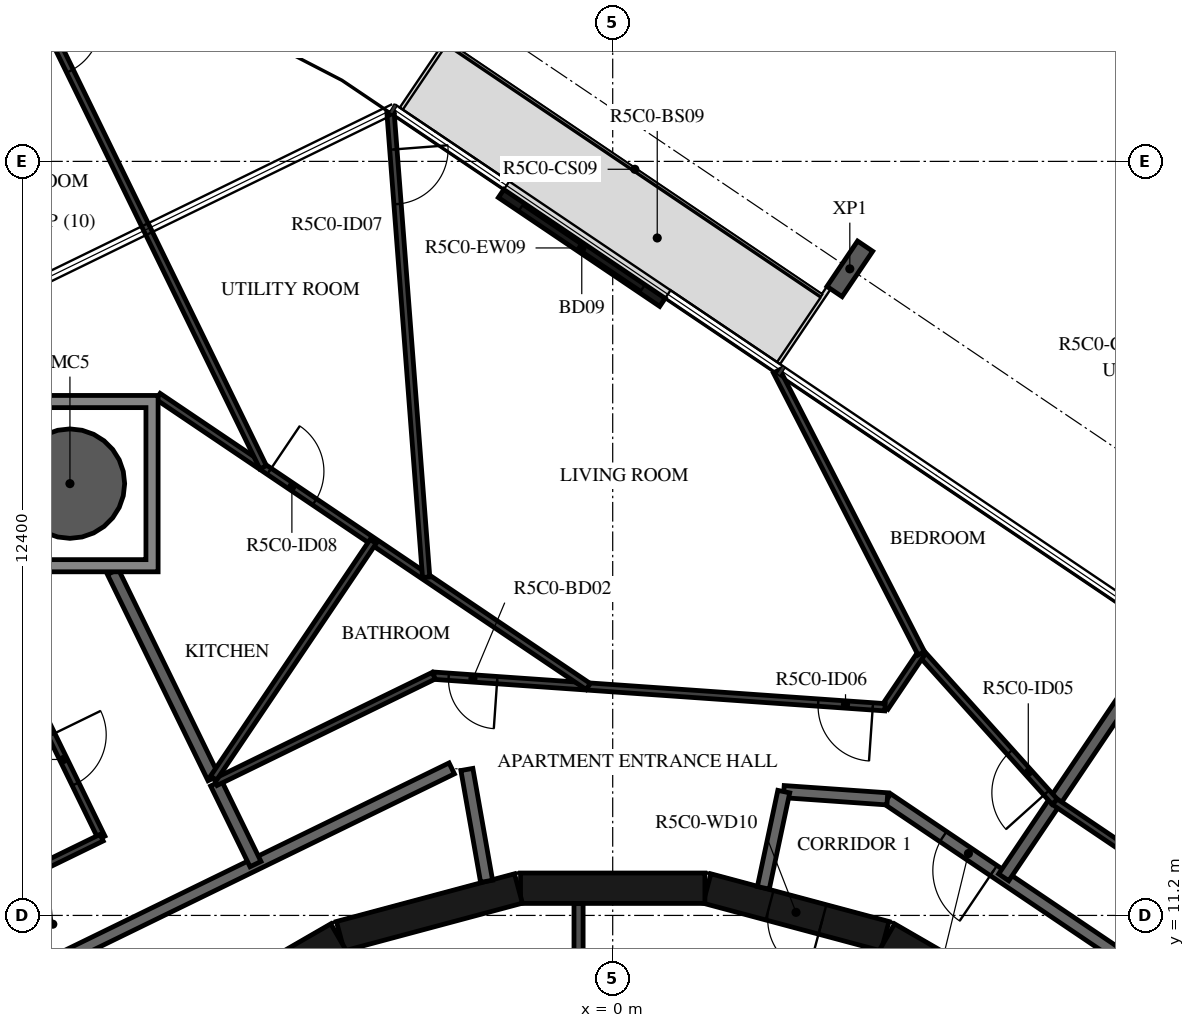
"""IFC4 building model, lengths in metres.
Left out: names, types, materials, properties, quantities, classifications, styles, units other than length and angle.
Written with IfcOpenShell. Run it as: python <this file> out.ifc"""

import sys

from ifc_helpers import new_model, si_unit, direction, frame, frame_2d, origin, origin_2d, place, context, subcontext, project, spatial, polyline, rectangle, hollow_circle, i_section, outline, extrude, element, fill, save


model = new_model("IFC4")
c1 = context("Model", 3, precision=1e-05, world=origin(), true_north=direction((0.0, 1.0)))
c2 = subcontext(c1, "Body", "Model", "MODEL_VIEW")
j1 = project(units=[si_unit("LENGTHUNIT", "METRE"), si_unit("PLANEANGLEUNIT", "RADIAN")], contexts=[c1])
p1 = place(None, origin())
s1 = spatial("IfcSite", under=j1, at=p1, CompositionType="ELEMENT")
p2 = place(p1, origin())
s2 = spatial("IfcBuilding", under=s1, at=p2, CompositionType="ELEMENT")
p3 = place(p2, frame((0.0, 0.0, 216.4)))
s3 = spatial("IfcBuildingStorey", under=s2, at=p3, CompositionType="ELEMENT", Elevation=216.4)
p4 = place(p3, frame((-8.926, 18.301, -0.38), z_axis=(0.0, 0.0, 1.0), x_axis=(1.0, 0.0, 0.0)))
e1 = element("IfcColumn", 1, at=p4, inside=s3, PredefinedType="COLUMN", context=c2, shape_type="SweptSolid", body=[
    extrude(hollow_circle(Radius=0.9, WallThickness=0.04, at=origin_2d()), origin(), (0.0, 0.0, 1.0), 2.616),
])
p5 = place(p3, frame((3.899, 21.833, -0.38), z_axis=(0.0, 0.0, 1.0), x_axis=(0.829037661466, -0.559192771654, 0.0)))
e2 = element("IfcColumn", 2, at=p5, inside=s3, PredefinedType="COLUMN", context=c2, shape_type="SweptSolid", body=[
    extrude(i_section(OverallWidth=0.3, OverallDepth=0.9, WebThickness=0.019, FlangeThickness=0.035, FilletRadius=0.03, at=origin_2d()), origin(), (0.0, 0.0, 1.0), 2.616),
])
p6 = place(p3, frame((0.818, 21.282, 0.0), z_axis=(0.0, 0.0, 1.0), x_axis=(-0.829044984211, 0.559181915082, 0.0)))
e3 = element("IfcWall", 3, at=p6, inside=s3, PredefinedType="STANDARD", context=c2, shape_type="SweptSolid", body=[
    extrude(rectangle(XDim=3.2, YDim=0.16, at=frame_2d((1.6, 0.0))), origin(), (0.0, 0.0, 1.0), 3.05),
])
p7 = place(p6, frame((0.4, 0.0, 0.0)))
e4 = element("IfcOpeningElement", 4, at=p7, cuts=e3, PredefinedType="OPENING", context=c2, shape_type="SweptSolid", body=[
    extrude(rectangle(XDim=2.4, YDim=2.4, at=frame_2d((1.2, 1.2))), frame((0.0, 0.09, 0.0), z_axis=(0.0, -1.0, 0.0), x_axis=(1.0, 0.0, 0.0)), (0.0, 0.0, 1.0), 0.18),
])
p8 = place(p3, frame((7.137, 9.329, 0.0), z_axis=(0.0, 0.0, 1.0), x_axis=(-0.865975092491, 0.500087131594, 0.0)))
e5 = element("IfcWall", 5, at=p8, inside=s3, PredefinedType="SHEAR", context=c2, shape_type="SweptSolid", body=[
    extrude(rectangle(XDim=3.033, YDim=0.5, at=frame_2d((1.516, 0.0))), origin(), (0.0, 0.0, 1.0), 3.05),
])
p9 = place(p3, frame((4.479, 10.858, 0.0), z_axis=(0.0, 0.0, 1.0), x_axis=(-0.965948410781, 0.258734743916, 0.0)))
e6 = element("IfcWall", 6, at=p9, inside=s3, PredefinedType="SHEAR", context=c2, shape_type="SweptSolid", body=[
    extrude(rectangle(XDim=3.033, YDim=0.5, at=frame_2d((1.516, 0.0))), origin(), (0.0, 0.0, 1.0), 3.05),
])
p10 = place(p9, frame((1.066, 0.0, 0.0)))
e7 = element("IfcOpeningElement", 7, at=p10, cuts=e6, PredefinedType="OPENING", context=c2, shape_type="SweptSolid", body=[
    extrude(rectangle(XDim=0.9, YDim=2.1, at=frame_2d((0.45, 1.05))), frame((0.0, 0.26, 0.0), z_axis=(0.0, -1.0, 0.0), x_axis=(1.0, 0.0, 0.0)), (0.0, 0.0, 1.0), 0.52),
])
for number, where, z_axis, x_axis in (
    (8, (1.516, 11.647, 0.0), (0.0, 0.0, 1.0), (-1.0, 0.0, 0.0)),
    (9, (-1.55, 11.643, 0.0), (0.0, 0.0, 1.0), (-0.966, -0.259, 0.0)),
    (10, (-4.51, 10.845, 0.0), (0.0, 0.0, 1.0), (-0.866, -0.5, 0.0)),
):
    element("IfcWall", number, at=place(p3, frame(where, z_axis=z_axis, x_axis=x_axis)), inside=s3, PredefinedType="SHEAR", context=c2, shape_type="SweptSolid", body=[
        extrude(rectangle(XDim=3.033, YDim=0.5, at=frame_2d((1.516, 0.0))), origin(), (0.0, 0.0, 1.0), 3.05),
    ])
p11 = place(p3, frame((-0.562, 8.97, 0.0), z_axis=(0.0, 0.0, 1.0), x_axis=(0.0, 1.0, 0.0)))
e11 = element("IfcWall", 11, at=p11, inside=s3, PredefinedType="PARTITIONING", context=c2, shape_type="SweptSolid", body=[
    extrude(rectangle(XDim=2.427, YDim=0.15, at=frame_2d((1.214, 0.0))), origin(), (0.0, 0.0, 1.0), 3.05),
])
p12 = place(p11, frame((0.764, 0.0, 0.0)))
e12 = element("IfcOpeningElement", 12, at=p12, cuts=e11, PredefinedType="OPENING", context=c2, shape_type="SweptSolid", body=[
    extrude(rectangle(XDim=0.9, YDim=2.1, at=frame_2d((0.45, 1.05))), frame((0.0, 0.085, 0.0), z_axis=(0.0, -1.0, 0.0), x_axis=(1.0, 0.0, 0.0)), (0.0, 0.0, 1.0), 0.17),
])
p13 = place(p3, frame((10.47, 9.101, 0.0), z_axis=(0.0, 0.0, 1.0), x_axis=(-0.829035841718, 0.559195469534, 0.0)))
e13 = element("IfcWall", 13, at=p13, inside=s3, PredefinedType="STANDARD", context=c2, shape_type="SweptSolid", body=[
    extrude(rectangle(XDim=7.181, YDim=0.2, at=frame_2d((3.591, 0.0))), origin(), (0.0, 0.0, 1.0), 3.05),
])
p14 = place(p13, frame((0.2, 0.0, 0.0)))
e14 = element("IfcOpeningElement", 14, at=p14, cuts=e13, PredefinedType="OPENING", context=c2, shape_type="SweptSolid", body=[
    extrude(rectangle(XDim=1.0, YDim=2.1, at=frame_2d((0.5, 1.05))), frame((0.0, 0.11, 0.0), z_axis=(0.0, -1.0, 0.0), x_axis=(1.0, 0.0, 0.0)), (0.0, 0.0, 1.0), 0.22),
])
p15 = place(p13, frame((5.073, 0.0, 0.0)))
e15 = element("IfcOpeningElement", 15, at=p15, cuts=e13, PredefinedType="OPENING", context=c2, shape_type="SweptSolid", body=[
    extrude(rectangle(XDim=1.0, YDim=2.1, at=frame_2d((0.5, 1.05))), frame((0.0, 0.11, 0.0), z_axis=(0.0, -1.0, 0.0), x_axis=(1.0, 0.0, 0.0)), (0.0, 0.0, 1.0), 0.22),
])
p16 = place(p3, frame((4.517, 13.117, 0.0), z_axis=(0.0, 0.0, 1.0), x_axis=(-0.997562153664, 0.069783591025, 0.0)))
e16 = element("IfcWall", 16, at=p16, inside=s3, PredefinedType="STANDARD", context=c2, shape_type="SweptSolid", body=[
    extrude(rectangle(XDim=1.707, YDim=0.2, at=frame_2d((0.854, 0.0))), origin(), (0.0, 0.0, 1.0), 3.05),
])
p17 = place(p3, frame((2.813, 13.236, 0.0), z_axis=(0.0, 0.0, 1.0), x_axis=(-0.207911086063, -0.978147729278, 0.0)))
e17 = element("IfcWall", 17, at=p17, inside=s3, PredefinedType="STANDARD", context=c2, shape_type="SweptSolid", body=[
    extrude(rectangle(XDim=1.618, YDim=0.2, at=frame_2d((0.809, 0.0))), origin(), (0.0, 0.0, 1.0), 3.05),
])
p18 = place(p3, frame((-2.074, 11.761, 0.0), z_axis=(0.0, 0.0, 1.0), x_axis=(-0.173740587112, 0.984791454263, 0.0)))
e18 = element("IfcWall", 18, at=p18, inside=s3, PredefinedType="STANDARD", context=c2, shape_type="SweptSolid", body=[
    extrude(rectangle(XDim=1.867, YDim=0.2, at=frame_2d((0.934, 0.0))), origin(), (0.0, 0.0, 1.0), 3.05),
])
p19 = place(p3, frame((-2.647, 13.618, 0.0), z_axis=(0.0, 0.0, 1.0), x_axis=(-0.898796543751, -0.438366026218, 0.0)))
e19 = element("IfcWall", 19, at=p19, inside=s3, PredefinedType="STANDARD", context=c2, shape_type="SweptSolid", body=[
    extrude(rectangle(XDim=7.181, YDim=0.2, at=frame_2d((3.591, 0.0))), origin(), (0.0, 0.0, 1.0), 3.05),
])
p20 = place(p3, frame((9.104, 15.79, 0.0), z_axis=(0.0, 0.0, 1.0), x_axis=(-0.559193912135, -0.829036892201, 0.0)))
e20 = element("IfcWall", 20, at=p20, inside=s3, PredefinedType="STANDARD", context=c2, shape_type="SweptSolid", body=[
    extrude(rectangle(XDim=4.781, YDim=0.2, at=frame_2d((2.39, 0.0))), origin(), (0.0, 0.0, 1.0), 3.05),
])
p21 = place(p3, frame((-6.522, 13.373, 0.0), z_axis=(0.0, 0.0, 1.0), x_axis=(0.438277270821, -0.8988398266, 0.0)))
e21 = element("IfcWall", 21, at=p21, inside=s3, PredefinedType="STANDARD", context=c2, shape_type="SweptSolid", body=[
    extrude(rectangle(XDim=1.479, YDim=0.2, at=frame_2d((0.74, 0.0))), origin(), (0.0, 0.0, 1.0), 3.05),
])
p22 = place(p3, frame((-8.219, 16.851, 0.0), z_axis=(0.0, 0.0, 1.0), x_axis=(0.438291091101, -0.898833087654, 0.0)))
e22 = element("IfcWall", 22, at=p22, inside=s3, PredefinedType="STANDARD", context=c2, shape_type="SweptSolid", body=[
    extrude(rectangle(XDim=3.774, YDim=0.2, at=frame_2d((1.887, 0.0))), origin(), (0.0, 0.0, 1.0), 3.05),
])
p23 = place(p3, frame((11.642, 10.12, 0.0), z_axis=(0.0, 0.0, 1.0), x_axis=(-0.829054664054, 0.559167563446, 0.0)))
e23 = element("IfcWall", 23, at=p23, inside=s3, PredefinedType="PARTITIONING", context=c2, shape_type="SweptSolid", body=[
    extrude(rectangle(XDim=5.275, YDim=0.12, at=frame_2d((2.637, 0.0))), origin(), (0.0, 0.0, 1.0), 3.05),
])
p24 = place(p23, frame((0.2, 0.0, 0.0)))
e24 = element("IfcOpeningElement", 24, at=p24, cuts=e23, PredefinedType="OPENING", context=c2, shape_type="SweptSolid", body=[
    extrude(rectangle(XDim=0.9, YDim=2.1, at=frame_2d((0.45, 1.05))), frame((0.0, 0.07, 0.0), z_axis=(0.0, -1.0, 0.0), x_axis=(1.0, 0.0, 0.0)), (0.0, 0.0, 1.0), 0.14),
])
p25 = place(p3, frame((7.269, 13.07, 0.0), z_axis=(0.0, 0.0, 1.0), x_axis=(-0.668495993587, 0.743715743116, 0.0)))
e25 = element("IfcWall", 25, at=p25, inside=s3, PredefinedType="PARTITIONING", context=c2, shape_type="SweptSolid", body=[
    extrude(rectangle(XDim=3.281, YDim=0.12, at=frame_2d((1.641, 0.0))), origin(), (0.0, 0.0, 1.0), 3.05),
])
p26 = place(p25, frame((0.2, 0.0, 0.0)))
e26 = element("IfcOpeningElement", 26, at=p26, cuts=e25, PredefinedType="OPENING", context=c2, shape_type="SweptSolid", body=[
    extrude(rectangle(XDim=0.9, YDim=2.1, at=frame_2d((0.45, 1.05))), frame((0.0, 0.07, 0.0), z_axis=(0.0, -1.0, 0.0), x_axis=(1.0, 0.0, 0.0)), (0.0, 0.0, 1.0), 0.14),
])
p27 = place(p3, frame((5.075, 15.51, 0.0), z_axis=(0.0, 0.0, 1.0), x_axis=(-0.559221936342, -0.829017988896, 0.0)))
e27 = element("IfcWall", 27, at=p27, inside=s3, PredefinedType="PARTITIONING", context=c2, shape_type="SweptSolid", body=[
    extrude(rectangle(XDim=1.07, YDim=0.12, at=frame_2d((0.535, 0.0))), origin(), (0.0, 0.0, 1.0), 3.05),
])
p28 = place(p3, frame((4.477, 14.623, 0.0), z_axis=(0.0, 0.0, 1.0), x_axis=(-0.997564862172, 0.069744861884, 0.0)))
e28 = element("IfcWall", 28, at=p28, inside=s3, PredefinedType="PARTITIONING", context=c2, shape_type="SweptSolid", body=[
    extrude(rectangle(XDim=7.438, YDim=0.12, at=frame_2d((3.719, 0.0))), origin(), (0.0, 0.0, 1.0), 3.05),
])
p29 = place(p28, frame((0.2, 0.0, 0.0)))
e29 = element("IfcOpeningElement", 29, at=p29, cuts=e28, PredefinedType="OPENING", context=c2, shape_type="SweptSolid", body=[
    extrude(rectangle(XDim=0.9, YDim=2.1, at=frame_2d((0.45, 1.05))), frame((0.0, 0.07, 0.0), z_axis=(0.0, -1.0, 0.0), x_axis=(1.0, 0.0, 0.0)), (0.0, 0.0, 1.0), 0.14),
])
p30 = place(p28, frame((6.392, 0.0, 0.0)))
e30 = element("IfcOpeningElement", 30, at=p30, cuts=e28, PredefinedType="OPENING", context=c2, shape_type="SweptSolid", body=[
    extrude(rectangle(XDim=0.8, YDim=2.1, at=frame_2d((0.4, 1.05))), frame((0.0, 0.07, 0.0), z_axis=(0.0, -1.0, 0.0), x_axis=(1.0, 0.0, 0.0)), (0.0, 0.0, 1.0), 0.14),
])
p31 = place(p3, frame((-2.943, 15.142, 0.0), z_axis=(0.0, 0.0, 1.0), x_axis=(-0.89881075705, -0.438336883014, 0.0)))
e31 = element("IfcWall", 31, at=p31, inside=s3, PredefinedType="PARTITIONING", context=c2, shape_type="SweptSolid", body=[
    extrude(rectangle(XDim=3.992, YDim=0.12, at=frame_2d((1.996, 0.0))), origin(), (0.0, 0.0, 1.0), 3.05),
])
p32 = place(p3, frame((2.696, 20.148, 0.0), z_axis=(0.0, 0.0, 1.0), x_axis=(0.456387956197, -0.889780890691, 0.0)))
e32 = element("IfcWall", 32, at=p32, inside=s3, PredefinedType="PARTITIONING", context=c2, shape_type="SweptSolid", body=[
    extrude(rectangle(XDim=5.213, YDim=0.12, at=frame_2d((2.606, 0.0))), origin(), (0.0, 0.0, 1.0), 3.05),
])
p33 = place(p3, frame((-7.476, 19.735, 0.0), z_axis=(0.0, 0.0, 1.0), x_axis=(0.829035412992, -0.559196105142, 0.0)))
e33 = element("IfcWall", 33, at=p33, inside=s3, PredefinedType="PARTITIONING", context=c2, shape_type="SweptSolid", body=[
    extrude(rectangle(XDim=8.531, YDim=0.12, at=frame_2d((4.266, 0.0))), origin(), (0.0, 0.0, 1.0), 3.05),
])
p34 = place(p33, frame((2.204, 0.0, 0.0)))
e34 = element("IfcOpeningElement", 34, at=p34, cuts=e33, PredefinedType="OPENING", context=c2, shape_type="SweptSolid", body=[
    extrude(rectangle(XDim=0.9, YDim=2.1, at=frame_2d((0.45, 1.05))), frame((0.0, 0.07, 0.0), z_axis=(0.0, -1.0, 0.0), x_axis=(1.0, 0.0, 0.0)), (0.0, 0.0, 1.0), 0.14),
])
p35 = place(p3, frame((-3.653, 24.394, 0.0), z_axis=(0.0, 0.0, 1.0), x_axis=(0.076513576433, -0.997068539581, 0.0)))
e35 = element("IfcWall", 35, at=p35, inside=s3, PredefinedType="PARTITIONING", context=c2, shape_type="SweptSolid", body=[
    extrude(rectangle(XDim=7.655, YDim=0.12, at=frame_2d((3.827, 0.0))), origin(), (0.0, 0.0, 1.0), 3.05),
])
p36 = place(p35, frame((0.6, 0.0, 0.0)))
e36 = element("IfcOpeningElement", 36, at=p36, cuts=e35, PredefinedType="OPENING", context=c2, shape_type="SweptSolid", body=[
    extrude(rectangle(XDim=0.9, YDim=2.1, at=frame_2d((0.45, 1.05))), frame((0.0, 0.07, 0.0), z_axis=(0.0, -1.0, 0.0), x_axis=(1.0, 0.0, 0.0)), (0.0, 0.0, 1.0), 0.14),
])
p37 = place(p3, frame((-3.939, 17.35, 0.0), z_axis=(0.0, 0.0, 1.0), x_axis=(-0.559193216274, -0.829037361566, 0.0)))
e37 = element("IfcWall", 37, at=p37, inside=s3, PredefinedType="PARTITIONING", context=c2, shape_type="SweptSolid", body=[
    extrude(rectangle(XDim=4.694, YDim=0.12, at=frame_2d((2.347, 0.0))), origin(), (0.0, 0.0, 1.0), 3.05),
])
p38 = place(p3, frame((-9.496, 26.254, 0.0), z_axis=(0.0, 0.0, 1.0), x_axis=(0.438361739807, -0.89879863433, 0.0)))
e38 = element("IfcWall", 38, at=p38, inside=s3, PredefinedType="PARTITIONING", context=c2, shape_type="SweptSolid", body=[
    extrude(rectangle(XDim=8.549, YDim=0.12, at=frame_2d((4.274, 0.0))), origin(), (0.0, 0.0, 1.0), 3.05),
])
p39 = place(p38, frame((0.4, 0.0, 0.0)))
e39 = element("IfcOpeningElement", 39, at=p39, cuts=e38, PredefinedType="OPENING", context=c2, shape_type="SweptSolid", body=[
    extrude(rectangle(XDim=0.9, YDim=2.1, at=frame_2d((0.45, 1.05))), frame((0.0, 0.07, 0.0), z_axis=(0.0, -1.0, 0.0), x_axis=(1.0, 0.0, 0.0)), (0.0, 0.0, 1.0), 0.14),
])
p40 = place(p3, frame((-10.5, 16.775, 0.0), z_axis=(0.0, 0.0, 1.0), x_axis=(0.438345136783, -0.898806731761, 0.0)))
e40 = element("IfcWall", 40, at=p40, inside=s3, PredefinedType="PARTITIONING", context=c2, shape_type="SweptSolid", body=[
    extrude(rectangle(XDim=4.78, YDim=0.12, at=frame_2d((2.39, 0.0))), origin(), (0.0, 0.0, 1.0), 3.05),
])
p41 = place(p40, frame((0.7, 0.0, 0.0)))
e41 = element("IfcOpeningElement", 41, at=p41, cuts=e40, PredefinedType="OPENING", context=c2, shape_type="SweptSolid", body=[
    extrude(rectangle(XDim=0.8, YDim=2.1, at=frame_2d((0.4, 1.05))), frame((0.0, 0.07, 0.0), z_axis=(0.0, -1.0, 0.0), x_axis=(1.0, 0.0, 0.0)), (0.0, 0.0, 1.0), 0.14),
])
p42 = place(p40, frame((2.899, 0.0, 0.0)))
e42 = element("IfcOpeningElement", 42, at=p42, cuts=e40, PredefinedType="OPENING", context=c2, shape_type="SweptSolid", body=[
    extrude(rectangle(XDim=0.9, YDim=2.1, at=frame_2d((0.45, 1.05))), frame((0.0, 0.07, 0.0), z_axis=(0.0, -1.0, 0.0), x_axis=(1.0, 0.0, 0.0)), (0.0, 0.0, 1.0), 0.14),
])
p43 = place(p3, frame((-8.405, 12.479, 0.0), z_axis=(0.0, 0.0, 1.0), x_axis=(-0.898784427692, -0.438390867307, 0.0)))
e43 = element("IfcWall", 43, at=p43, inside=s3, PredefinedType="PARTITIONING", context=c2, shape_type="SweptSolid", body=[
    extrude(rectangle(XDim=1.908, YDim=0.12, at=frame_2d((0.954, 0.0))), origin(), (0.0, 0.0, 1.0), 3.05),
])
p44 = place(p3, origin())
e44 = element("IfcWall", 44, at=p44, inside=s3, PredefinedType="STANDARD", context=c2, shape_type="SweptSolid", body=[
    extrude(outline(polyline([(-7.476, 19.751), (-7.476, 16.851), (-10.376, 16.851), (-10.376, 19.751), (-7.476, 19.751)]), holes=[polyline([(-10.176, 17.051), (-7.676, 17.051), (-7.676, 19.551), (-10.176, 19.551), (-10.176, 17.051)])]), origin(), (0.0, 0.0, 1.0), 3.05),
])
p45 = place(p7, origin())
e45 = element("IfcDoor", 45, at=p45, inside=s3, OperationType="DOUBLE_DOOR_SLIDING", PredefinedType="DOOR", context=c2, shape_type="SweptSolid", body=[
    extrude(rectangle(XDim=2.4, YDim=2.4, at=frame_2d((1.2, 1.2))), frame((0.0, 0.025, 0.0), z_axis=(0.0, -1.0, 0.0), x_axis=(1.0, 0.0, 0.0)), (0.0, 0.0, 1.0), 0.05),
])
fill(e4, e45)
p46 = place(p10, origin())
e46 = element("IfcDoor", 46, at=p46, inside=s3, OperationType="SINGLE_SWING_RIGHT", PredefinedType="DOOR", context=c2, shape_type="SweptSolid", body=[
    extrude(rectangle(XDim=0.9, YDim=2.1, at=frame_2d((0.45, 1.05))), frame((0.0, 0.025, 0.0), z_axis=(0.0, -1.0, 0.0), x_axis=(1.0, 0.0, 0.0)), (0.0, 0.0, 1.0), 0.05),
])
fill(e7, e46)
p47 = place(p15, origin())
e47 = element("IfcDoor", 47, at=p47, inside=s3, OperationType="SINGLE_SWING_RIGHT", PredefinedType="DOOR", context=c2, shape_type="SweptSolid", body=[
    extrude(rectangle(XDim=1.0, YDim=2.1, at=frame_2d((0.5, 1.05))), frame((0.0, 0.025, 0.0), z_axis=(0.0, -1.0, 0.0), x_axis=(1.0, 0.0, 0.0)), (0.0, 0.0, 1.0), 0.05),
])
fill(e15, e47)
p48 = place(p26, origin())
e48 = element("IfcDoor", 48, at=p48, inside=s3, OperationType="SINGLE_SWING_RIGHT", PredefinedType="DOOR", context=c2, shape_type="SweptSolid", body=[
    extrude(rectangle(XDim=0.9, YDim=2.1, at=frame_2d((0.45, 1.05))), frame((0.0, 0.025, 0.0), z_axis=(0.0, -1.0, 0.0), x_axis=(1.0, 0.0, 0.0)), (0.0, 0.0, 1.0), 0.05),
])
fill(e26, e48)
p49 = place(p29, origin())
e49 = element("IfcDoor", 49, at=p49, inside=s3, OperationType="SINGLE_SWING_RIGHT", PredefinedType="DOOR", context=c2, shape_type="SweptSolid", body=[
    extrude(rectangle(XDim=0.9, YDim=2.1, at=frame_2d((0.45, 1.05))), frame((0.0, 0.025, 0.0), z_axis=(0.0, -1.0, 0.0), x_axis=(1.0, 0.0, 0.0)), (0.0, 0.0, 1.0), 0.05),
])
fill(e29, e49)
p50 = place(p30, origin())
e50 = element("IfcDoor", 50, at=p50, inside=s3, OperationType="SINGLE_SWING_RIGHT", PredefinedType="DOOR", context=c2, shape_type="SweptSolid", body=[
    extrude(rectangle(XDim=0.8, YDim=2.1, at=frame_2d((0.4, 1.05))), frame((0.0, 0.025, 0.0), z_axis=(0.0, -1.0, 0.0), x_axis=(1.0, 0.0, 0.0)), (0.0, 0.0, 1.0), 0.05),
])
fill(e30, e50)
p51 = place(p36, origin())
e51 = element("IfcDoor", 51, at=p51, inside=s3, OperationType="SINGLE_SWING_RIGHT", PredefinedType="DOOR", context=c2, shape_type="SweptSolid", body=[
    extrude(rectangle(XDim=0.9, YDim=2.1, at=frame_2d((0.45, 1.05))), frame((0.0, 0.025, 0.0), z_axis=(0.0, -1.0, 0.0), x_axis=(1.0, 0.0, 0.0)), (0.0, 0.0, 1.0), 0.05),
])
fill(e36, e51)
p52 = place(p34, origin())
e52 = element("IfcDoor", 52, at=p52, inside=s3, OperationType="SINGLE_SWING_LEFT", PredefinedType="DOOR", context=c2, shape_type="SweptSolid", body=[
    extrude(rectangle(XDim=0.9, YDim=2.1, at=frame_2d((0.45, 1.05))), frame((0.0, 0.025, 0.0), z_axis=(0.0, -1.0, 0.0), x_axis=(1.0, 0.0, 0.0)), (0.0, 0.0, 1.0), 0.05),
])
fill(e34, e52)
p53 = place(p39, origin())
e53 = element("IfcDoor", 53, at=p53, inside=s3, OperationType="SINGLE_SWING_RIGHT", PredefinedType="DOOR", context=c2, shape_type="SweptSolid", body=[
    extrude(rectangle(XDim=0.9, YDim=2.1, at=frame_2d((0.45, 1.05))), frame((0.0, 0.025, 0.0), z_axis=(0.0, -1.0, 0.0), x_axis=(1.0, 0.0, 0.0)), (0.0, 0.0, 1.0), 0.05),
])
fill(e39, e53)
p54 = place(p42, origin())
e54 = element("IfcDoor", 54, at=p54, inside=s3, OperationType="SINGLE_SWING_LEFT", PredefinedType="DOOR", context=c2, shape_type="SweptSolid", body=[
    extrude(rectangle(XDim=0.9, YDim=2.1, at=frame_2d((0.45, 1.05))), frame((0.0, 0.025, 0.0), z_axis=(0.0, -1.0, 0.0), x_axis=(1.0, 0.0, 0.0)), (0.0, 0.0, 1.0), 0.05),
])
fill(e42, e54)
save(model, sys.argv[1])
